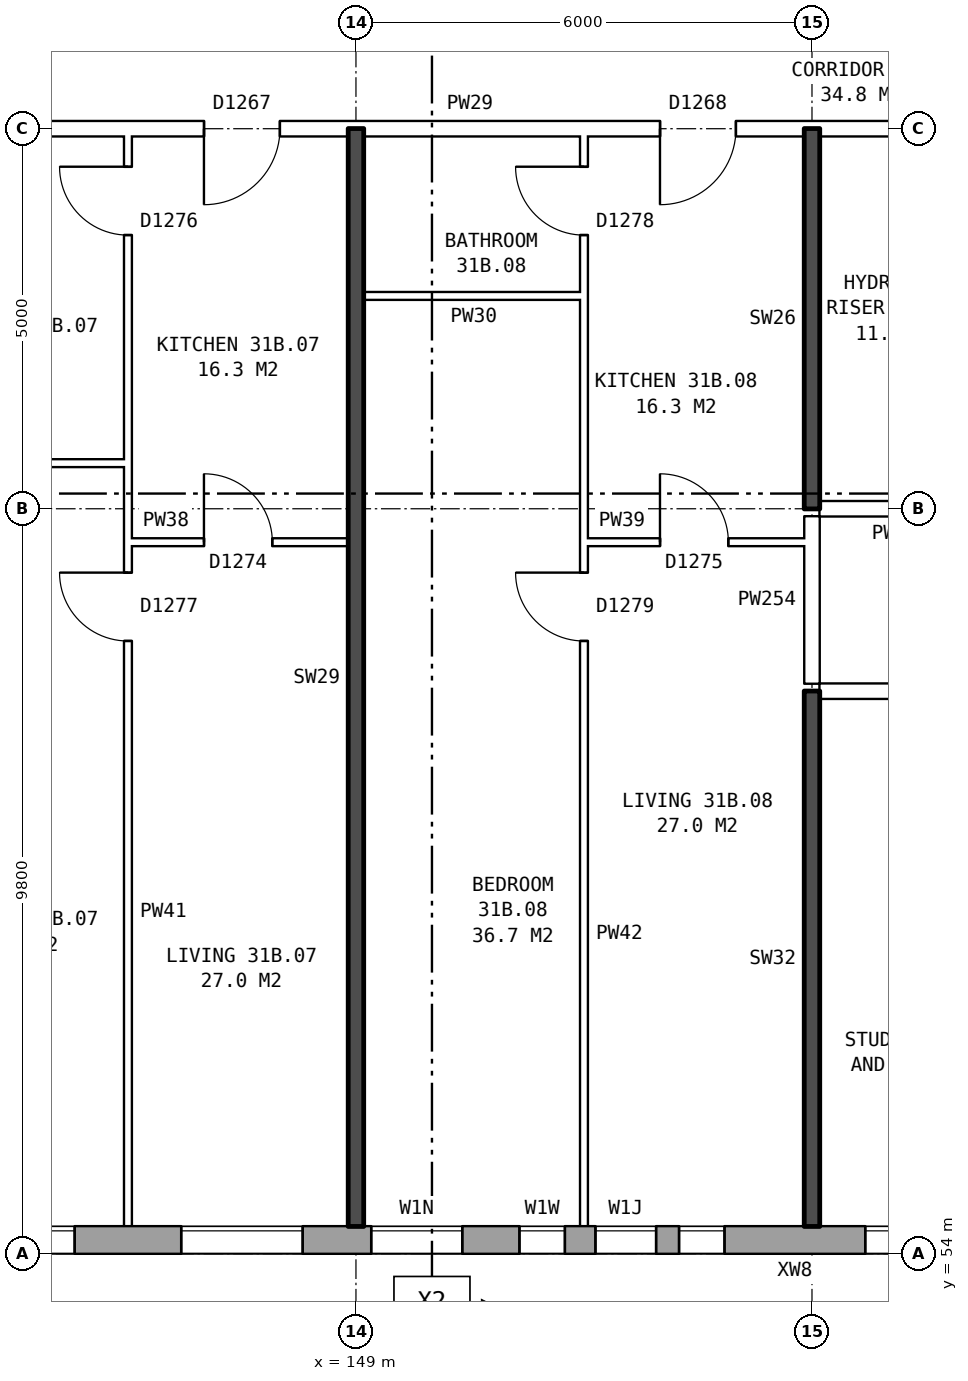
"""IFC4 building model, lengths in metres.
Left out: names, types, materials, properties, quantities, classifications, styles, units other than length and angle.
Written with IfcOpenShell. Run it as: python <this file> out.ifc"""

import sys

from ifc_helpers import new_model, si_unit, direction, frame, frame_2d, origin, place, context, subcontext, project, spatial, rectangle, extrude, element, fill, save


model = new_model("IFC4")
c1 = context("Model", 3, precision=1e-05, world=origin(), true_north=direction((0.0, 1.0)))
c2 = subcontext(c1, "Body", "Model", "MODEL_VIEW")
j1 = project(units=[si_unit("LENGTHUNIT", "METRE"), si_unit("PLANEANGLEUNIT", "RADIAN")], contexts=[c1])
p1 = place(None, origin())
s1 = spatial("IfcSite", under=j1, at=p1, CompositionType="ELEMENT")
p2 = place(p1, origin())
s2 = spatial("IfcBuilding", under=s1, at=p2, CompositionType="ELEMENT")
p3 = place(p2, frame((0.0, 0.0, 111.9)))
s3 = spatial("IfcBuildingStorey", under=s2, at=p3, CompositionType="ELEMENT", Elevation=111.9)
p4 = place(p3, frame((134.075, 54.18, 0.0), z_axis=(0.0, 0.0, 1.0), x_axis=(1.0, 0.0, 0.0)))
e1 = element("IfcWall", 1, at=p4, inside=s3, PredefinedType="STANDARD", context=c2, shape_type="SweptSolid", body=[
    extrude(rectangle(XDim=36.851, YDim=0.36, at=frame_2d((18.425, 0.0))), origin(), (0.0, 0.0, 1.0), 2.85),
])
p5 = place(p4, frame((0.625, 0.0, 0.8)))
e2 = element("IfcOpeningElement", 2, at=p5, cuts=e1, PredefinedType="OPENING", context=c2, shape_type="SweptSolid", body=[
    extrude(rectangle(XDim=1.6, YDim=1.8, at=frame_2d((0.8, 0.9))), frame((0.0, 0.19, 0.0), z_axis=(0.0, -1.0, 0.0), x_axis=(1.0, 0.0, 0.0)), (0.0, 0.0, 1.0), 0.38),
])
p6 = place(p4, frame((3.625, 0.0, 0.8)))
e3 = element("IfcOpeningElement", 3, at=p6, cuts=e1, PredefinedType="OPENING", context=c2, shape_type="SweptSolid", body=[
    extrude(rectangle(XDim=1.6, YDim=1.8, at=frame_2d((0.8, 0.9))), frame((0.0, 0.19, 0.0), z_axis=(0.0, -1.0, 0.0), x_axis=(1.0, 0.0, 0.0)), (0.0, 0.0, 1.0), 0.38),
])
p7 = place(p4, frame((6.625, 0.0, 0.8)))
e4 = element("IfcOpeningElement", 4, at=p7, cuts=e1, PredefinedType="OPENING", context=c2, shape_type="SweptSolid", body=[
    extrude(rectangle(XDim=1.6, YDim=1.8, at=frame_2d((0.8, 0.9))), frame((0.0, 0.19, 0.0), z_axis=(0.0, -1.0, 0.0), x_axis=(1.0, 0.0, 0.0)), (0.0, 0.0, 1.0), 0.38),
])
p8 = place(p4, frame((9.625, 0.0, 0.8)))
e5 = element("IfcOpeningElement", 5, at=p8, cuts=e1, PredefinedType="OPENING", context=c2, shape_type="SweptSolid", body=[
    extrude(rectangle(XDim=1.6, YDim=1.8, at=frame_2d((0.8, 0.9))), frame((0.0, 0.19, 0.0), z_axis=(0.0, -1.0, 0.0), x_axis=(1.0, 0.0, 0.0)), (0.0, 0.0, 1.0), 0.38),
])
p9 = place(p4, frame((12.625, 0.0, 0.8)))
e6 = element("IfcOpeningElement", 6, at=p9, cuts=e1, PredefinedType="OPENING", context=c2, shape_type="SweptSolid", body=[
    extrude(rectangle(XDim=1.6, YDim=1.8, at=frame_2d((0.8, 0.9))), frame((0.0, 0.19, 0.0), z_axis=(0.0, -1.0, 0.0), x_axis=(1.0, 0.0, 0.0)), (0.0, 0.0, 1.0), 0.38),
])
p10 = place(p4, frame((15.125, 0.0, 1.35)))
e7 = element("IfcOpeningElement", 7, at=p10, cuts=e1, PredefinedType="OPENING", context=c2, shape_type="SweptSolid", body=[
    extrude(rectangle(XDim=1.2, YDim=1.2, at=frame_2d((0.6, 0.6))), frame((0.0, 0.19, 0.0), z_axis=(0.0, -1.0, 0.0), x_axis=(1.0, 0.0, 0.0)), (0.0, 0.0, 1.0), 0.38),
])
p11 = place(p4, frame((18.075, 0.0, 0.25)))
e8 = element("IfcOpeningElement", 8, at=p11, cuts=e1, PredefinedType="OPENING", context=c2, shape_type="SweptSolid", body=[
    extrude(rectangle(XDim=0.8, YDim=1.5, at=frame_2d((0.4, 0.75))), frame((0.0, 0.19, 0.0), z_axis=(0.0, -1.0, 0.0), x_axis=(1.0, 0.0, 0.0)), (0.0, 0.0, 1.0), 0.38),
])
p12 = place(p4, frame((21.625, 0.0, 0.8)))
e9 = element("IfcOpeningElement", 9, at=p12, cuts=e1, PredefinedType="OPENING", context=c2, shape_type="SweptSolid", body=[
    extrude(rectangle(XDim=1.6, YDim=1.8, at=frame_2d((0.8, 0.9))), frame((0.0, 0.19, 0.0), z_axis=(0.0, -1.0, 0.0), x_axis=(1.0, 0.0, 0.0)), (0.0, 0.0, 1.0), 0.38),
])
p13 = place(p4, frame((24.625, 0.0, 0.8)))
e10 = element("IfcOpeningElement", 10, at=p13, cuts=e1, PredefinedType="OPENING", context=c2, shape_type="SweptSolid", body=[
    extrude(rectangle(XDim=1.6, YDim=1.8, at=frame_2d((0.8, 0.9))), frame((0.0, 0.19, 0.0), z_axis=(0.0, -1.0, 0.0), x_axis=(1.0, 0.0, 0.0)), (0.0, 0.0, 1.0), 0.38),
])
p14 = place(p4, frame((27.625, 0.0, 0.8)))
e11 = element("IfcOpeningElement", 11, at=p14, cuts=e1, PredefinedType="OPENING", context=c2, shape_type="SweptSolid", body=[
    extrude(rectangle(XDim=1.6, YDim=1.8, at=frame_2d((0.8, 0.9))), frame((0.0, 0.19, 0.0), z_axis=(0.0, -1.0, 0.0), x_axis=(1.0, 0.0, 0.0)), (0.0, 0.0, 1.0), 0.38),
])
p15 = place(p4, frame((30.625, 0.0, 0.8)))
e12 = element("IfcOpeningElement", 12, at=p15, cuts=e1, PredefinedType="OPENING", context=c2, shape_type="SweptSolid", body=[
    extrude(rectangle(XDim=1.6, YDim=1.8, at=frame_2d((0.8, 0.9))), frame((0.0, 0.19, 0.0), z_axis=(0.0, -1.0, 0.0), x_axis=(1.0, 0.0, 0.0)), (0.0, 0.0, 1.0), 0.38),
])
p16 = place(p4, frame((33.625, 0.0, 0.8)))
e13 = element("IfcOpeningElement", 13, at=p16, cuts=e1, PredefinedType="OPENING", context=c2, shape_type="SweptSolid", body=[
    extrude(rectangle(XDim=1.6, YDim=1.8, at=frame_2d((0.8, 0.9))), frame((0.0, 0.19, 0.0), z_axis=(0.0, -1.0, 0.0), x_axis=(1.0, 0.0, 0.0)), (0.0, 0.0, 1.0), 0.38),
])
p17 = place(p4, frame((17.075, 0.0, 0.15)))
e14 = element("IfcOpeningElement", 14, at=p17, cuts=e1, PredefinedType="OPENING", context=c2, shape_type="SweptSolid", body=[
    extrude(rectangle(XDim=0.6, YDim=0.9, at=frame_2d((0.3, 0.45))), frame((0.0, 0.19, 0.0), z_axis=(0.0, -1.0, 0.0), x_axis=(1.0, 0.0, 0.0)), (0.0, 0.0, 1.0), 0.38),
])
p18 = place(p4, frame((19.175, 0.0, 0.15)))
e15 = element("IfcOpeningElement", 15, at=p18, cuts=e1, PredefinedType="OPENING", context=c2, shape_type="SweptSolid", body=[
    extrude(rectangle(XDim=0.6, YDim=0.9, at=frame_2d((0.3, 0.45))), frame((0.0, 0.19, 0.0), z_axis=(0.0, -1.0, 0.0), x_axis=(1.0, 0.0, 0.0)), (0.0, 0.0, 1.0), 0.38),
])
p19 = place(p3, frame((155.1, 61.4, 0.0), z_axis=(0.0, 0.0, 1.0), x_axis=(1.0, 0.0, 0.0)))
e16 = element("IfcWall", 16, at=p19, inside=s3, PredefinedType="PARTITIONING", context=c2, shape_type="SweptSolid", body=[
    extrude(rectangle(XDim=18.54, YDim=0.2, at=frame_2d((9.27, 0.0))), origin(), (0.0, 0.0, 1.0), 2.85),
])
p20 = place(p19, frame((1.45, 0.0, 0.0)))
e17 = element("IfcOpeningElement", 17, at=p20, cuts=e16, PredefinedType="OPENING", context=c2, shape_type="SweptSolid", body=[
    extrude(rectangle(XDim=1.0, YDim=2.1, at=frame_2d((0.5, 1.05))), frame((0.0, 0.11, 0.0), z_axis=(0.0, -1.0, 0.0), x_axis=(1.0, 0.0, 0.0)), (0.0, 0.0, 1.0), 0.22),
])
p21 = place(p19, frame((9.6, 0.0, 0.0)))
e18 = element("IfcOpeningElement", 18, at=p21, cuts=e16, PredefinedType="OPENING", context=c2, shape_type="SweptSolid", body=[
    extrude(rectangle(XDim=1.0, YDim=2.1, at=frame_2d((0.5, 1.05))), frame((0.0, 0.11, 0.0), z_axis=(0.0, -1.0, 0.0), x_axis=(1.0, 0.0, 0.0)), (0.0, 0.0, 1.0), 0.22),
])
p22 = place(p19, frame((13.4, 0.0, 0.0)))
e19 = element("IfcOpeningElement", 19, at=p22, cuts=e16, PredefinedType="OPENING", context=c2, shape_type="SweptSolid", body=[
    extrude(rectangle(XDim=1.0, YDim=2.1, at=frame_2d((0.5, 1.05))), frame((0.0, 0.11, 0.0), z_axis=(0.0, -1.0, 0.0), x_axis=(1.0, 0.0, 0.0)), (0.0, 0.0, 1.0), 0.22),
])
p23 = place(p3, frame((146.0, 63.36, 0.0), z_axis=(0.0, 0.0, 1.0), x_axis=(1.0, 0.0, 0.0)))
e20 = element("IfcWall", 20, at=p23, inside=s3, PredefinedType="PARTITIONING", context=c2, shape_type="SweptSolid", body=[
    extrude(rectangle(XDim=2.9, YDim=0.1, at=frame_2d((1.45, 0.0))), origin(), (0.0, 0.0, 1.0), 2.85),
])
p24 = place(p23, frame((1.0, 0.0, 0.0)))
e21 = element("IfcOpeningElement", 21, at=p24, cuts=e20, PredefinedType="OPENING", context=c2, shape_type="SweptSolid", body=[
    extrude(rectangle(XDim=0.9, YDim=2.1, at=frame_2d((0.45, 1.05))), frame((0.0, 0.06, 0.0), z_axis=(0.0, -1.0, 0.0), x_axis=(1.0, 0.0, 0.0)), (0.0, 0.0, 1.0), 0.12),
])
p25 = place(p3, frame((152.0, 63.36, 0.0), z_axis=(0.0, 0.0, 1.0), x_axis=(1.0, 0.0, 0.0)))
e22 = element("IfcWall", 22, at=p25, inside=s3, PredefinedType="PARTITIONING", context=c2, shape_type="SweptSolid", body=[
    extrude(rectangle(XDim=2.9, YDim=0.1, at=frame_2d((1.45, 0.0))), origin(), (0.0, 0.0, 1.0), 2.85),
])
p26 = place(p25, frame((1.0, 0.0, 0.0)))
e23 = element("IfcOpeningElement", 23, at=p26, cuts=e22, PredefinedType="OPENING", context=c2, shape_type="SweptSolid", body=[
    extrude(rectangle(XDim=0.9, YDim=2.1, at=frame_2d((0.45, 1.05))), frame((0.0, 0.06, 0.0), z_axis=(0.0, -1.0, 0.0), x_axis=(1.0, 0.0, 0.0)), (0.0, 0.0, 1.0), 0.12),
])
p27 = place(p3, frame((155.1, 63.8, 0.0), z_axis=(0.0, 0.0, 1.0), x_axis=(1.0, 0.0, 0.0)))
e24 = element("IfcWall", 24, at=p27, inside=s3, PredefinedType="PARTITIONING", context=c2, shape_type="SweptSolid", body=[
    extrude(rectangle(XDim=2.14, YDim=0.2, at=frame_2d((1.07, 0.0))), origin(), (0.0, 0.0, 1.0), 2.85),
])
p28 = place(p3, frame((142.76, 64.4, 0.0), z_axis=(0.0, 0.0, 1.0), x_axis=(1.0, 0.0, 0.0)))
e25 = element("IfcWall", 25, at=p28, inside=s3, PredefinedType="PARTITIONING", context=c2, shape_type="SweptSolid", body=[
    extrude(rectangle(XDim=3.24, YDim=0.1, at=frame_2d((1.62, 0.0))), origin(), (0.0, 0.0, 1.0), 2.85),
])
p29 = place(p3, frame((149.1, 66.6, 0.0), z_axis=(0.0, 0.0, 1.0), x_axis=(1.0, 0.0, 0.0)))
e26 = element("IfcWall", 26, at=p29, inside=s3, PredefinedType="PARTITIONING", context=c2, shape_type="SweptSolid", body=[
    extrude(rectangle(XDim=2.9, YDim=0.1, at=frame_2d((1.45, 0.0))), origin(), (0.0, 0.0, 1.0), 2.85),
])
p30 = place(p3, frame((142.76, 68.8, 0.0), z_axis=(0.0, 0.0, 1.0), x_axis=(1.0, 0.0, 0.0)))
e27 = element("IfcWall", 27, at=p30, inside=s3, PredefinedType="PARTITIONING", context=c2, shape_type="SweptSolid", body=[
    extrude(rectangle(XDim=14.48, YDim=0.2, at=frame_2d((7.24, 0.0))), origin(), (0.0, 0.0, 1.0), 2.85),
])
p31 = place(p30, frame((4.24, 0.0, 0.0)))
e28 = element("IfcOpeningElement", 28, at=p31, cuts=e27, PredefinedType="OPENING", context=c2, shape_type="SweptSolid", body=[
    extrude(rectangle(XDim=1.0, YDim=2.1, at=frame_2d((0.5, 1.05))), frame((0.0, 0.11, 0.0), z_axis=(0.0, -1.0, 0.0), x_axis=(1.0, 0.0, 0.0)), (0.0, 0.0, 1.0), 0.22),
])
p32 = place(p30, frame((10.24, 0.0, 0.0)))
e29 = element("IfcOpeningElement", 29, at=p32, cuts=e27, PredefinedType="OPENING", context=c2, shape_type="SweptSolid", body=[
    extrude(rectangle(XDim=1.0, YDim=2.1, at=frame_2d((0.5, 1.05))), frame((0.0, 0.11, 0.0), z_axis=(0.0, -1.0, 0.0), x_axis=(1.0, 0.0, 0.0)), (0.0, 0.0, 1.0), 0.22),
])
p33 = place(p3, frame((146.0, 54.36, 0.0), z_axis=(0.0, 0.0, 1.0), x_axis=(0.0, 1.0, 0.0)))
e30 = element("IfcWall", 30, at=p33, inside=s3, PredefinedType="PARTITIONING", context=c2, shape_type="SweptSolid", body=[
    extrude(rectangle(XDim=14.34, YDim=0.1, at=frame_2d((7.17, 0.0))), origin(), (0.0, 0.0, 1.0), 2.85),
])
p34 = place(p33, frame((7.7, 0.0, 0.0)))
e31 = element("IfcOpeningElement", 31, at=p34, cuts=e30, PredefinedType="OPENING", context=c2, shape_type="SweptSolid", body=[
    extrude(rectangle(XDim=0.9, YDim=2.1, at=frame_2d((0.45, 1.05))), frame((0.0, 0.06, 0.0), z_axis=(0.0, -1.0, 0.0), x_axis=(1.0, 0.0, 0.0)), (0.0, 0.0, 1.0), 0.12),
])
p35 = place(p33, frame((13.04, 0.0, 0.0)))
e32 = element("IfcOpeningElement", 32, at=p35, cuts=e30, PredefinedType="OPENING", context=c2, shape_type="SweptSolid", body=[
    extrude(rectangle(XDim=0.9, YDim=2.1, at=frame_2d((0.45, 1.05))), frame((0.0, 0.06, 0.0), z_axis=(0.0, -1.0, 0.0), x_axis=(1.0, 0.0, 0.0)), (0.0, 0.0, 1.0), 0.12),
])
p36 = place(p3, frame((149.0, 54.36, 0.0), z_axis=(0.0, 0.0, 1.0), x_axis=(0.0, 1.0, 0.0)))
e33 = element("IfcWall", 33, at=p36, inside=s3, PredefinedType="SOLIDWALL", context=c2, shape_type="SweptSolid", body=[
    extrude(rectangle(XDim=14.44, YDim=0.2, at=frame_2d((7.22, 0.0))), origin(), (0.0, 0.0, 1.0), 2.85),
])
p37 = place(p3, frame((152.0, 54.36, 0.0), z_axis=(0.0, 0.0, 1.0), x_axis=(0.0, 1.0, 0.0)))
e34 = element("IfcWall", 34, at=p37, inside=s3, PredefinedType="PARTITIONING", context=c2, shape_type="SweptSolid", body=[
    extrude(rectangle(XDim=14.34, YDim=0.1, at=frame_2d((7.17, 0.0))), origin(), (0.0, 0.0, 1.0), 2.85),
])
p38 = place(p37, frame((7.7, 0.0, 0.0)))
e35 = element("IfcOpeningElement", 35, at=p38, cuts=e34, PredefinedType="OPENING", context=c2, shape_type="SweptSolid", body=[
    extrude(rectangle(XDim=0.9, YDim=2.1, at=frame_2d((0.45, 1.05))), frame((0.0, 0.06, 0.0), z_axis=(0.0, -1.0, 0.0), x_axis=(1.0, 0.0, 0.0)), (0.0, 0.0, 1.0), 0.12),
])
p39 = place(p37, frame((13.04, 0.0, 0.0)))
e36 = element("IfcOpeningElement", 36, at=p39, cuts=e34, PredefinedType="OPENING", context=c2, shape_type="SweptSolid", body=[
    extrude(rectangle(XDim=0.9, YDim=2.1, at=frame_2d((0.45, 1.05))), frame((0.0, 0.06, 0.0), z_axis=(0.0, -1.0, 0.0), x_axis=(1.0, 0.0, 0.0)), (0.0, 0.0, 1.0), 0.12),
])
p40 = place(p3, frame((155.0, 54.36, 0.0), z_axis=(0.0, 0.0, 1.0), x_axis=(0.0, 1.0, 0.0)))
e37 = element("IfcWall", 37, at=p40, inside=s3, PredefinedType="SOLIDWALL", context=c2, shape_type="SweptSolid", body=[
    extrude(rectangle(XDim=7.04, YDim=0.2, at=frame_2d((3.52, 0.0))), origin(), (0.0, 0.0, 1.0), 2.85),
])
p41 = place(p3, frame((155.0, 61.5, 0.0), z_axis=(0.0, 0.0, 1.0), x_axis=(0.0, 1.0, 0.0)))
e38 = element("IfcWall", 38, at=p41, inside=s3, PredefinedType="PARTITIONING", context=c2, shape_type="SweptSolid", body=[
    extrude(rectangle(XDim=2.2, YDim=0.2, at=frame_2d((1.1, 0.0))), origin(), (0.0, 0.0, 1.0), 2.85),
])
p42 = place(p3, frame((155.0, 63.8, 0.0), z_axis=(0.0, 0.0, 1.0), x_axis=(0.0, 1.0, 0.0)))
e39 = element("IfcWall", 39, at=p42, inside=s3, PredefinedType="SOLIDWALL", context=c2, shape_type="SweptSolid", body=[
    extrude(rectangle(XDim=5.0, YDim=0.2, at=frame_2d((2.5, 0.0))), origin(), (0.0, 0.0, 1.0), 2.85),
])
p43 = place(p8, origin())
e40 = element("IfcWindow", 40, at=p43, inside=s3, PartitioningType="SINGLE_PANEL", PredefinedType="WINDOW", context=c2, shape_type="SweptSolid", body=[
    extrude(rectangle(XDim=1.6, YDim=1.8, at=frame_2d((0.8, 0.9))), frame((0.0, 0.15, 0.0), z_axis=(0.0, -1.0, 0.0), x_axis=(1.0, 0.0, 0.0)), (0.0, 0.0, 1.0), 0.06),
])
fill(e5, e40)
p44 = place(p9, origin())
e41 = element("IfcWindow", 41, at=p44, inside=s3, PartitioningType="SINGLE_PANEL", PredefinedType="WINDOW", context=c2, shape_type="SweptSolid", body=[
    extrude(rectangle(XDim=1.6, YDim=1.8, at=frame_2d((0.8, 0.9))), frame((0.0, 0.15, 0.0), z_axis=(0.0, -1.0, 0.0), x_axis=(1.0, 0.0, 0.0)), (0.0, 0.0, 1.0), 0.06),
])
fill(e6, e41)
p45 = place(p10, origin())
e42 = element("IfcWindow", 42, at=p45, inside=s3, PartitioningType="SINGLE_PANEL", PredefinedType="WINDOW", context=c2, shape_type="SweptSolid", body=[
    extrude(rectangle(XDim=1.2, YDim=1.2, at=frame_2d((0.6, 0.6))), frame((0.0, 0.15, 0.0), z_axis=(0.0, -1.0, 0.0), x_axis=(1.0, 0.0, 0.0)), (0.0, 0.0, 1.0), 0.06),
])
fill(e7, e42)
p46 = place(p11, origin())
e43 = element("IfcWindow", 43, at=p46, inside=s3, PartitioningType="SINGLE_PANEL", PredefinedType="WINDOW", context=c2, shape_type="SweptSolid", body=[
    extrude(rectangle(XDim=0.8, YDim=1.5, at=frame_2d((0.4, 0.75))), frame((0.0, 0.15, 0.0), z_axis=(0.0, -1.0, 0.0), x_axis=(1.0, 0.0, 0.0)), (0.0, 0.0, 1.0), 0.06),
])
fill(e8, e43)
p47 = place(p12, origin())
e44 = element("IfcWindow", 44, at=p47, inside=s3, PartitioningType="SINGLE_PANEL", PredefinedType="WINDOW", context=c2, shape_type="SweptSolid", body=[
    extrude(rectangle(XDim=1.6, YDim=1.8, at=frame_2d((0.8, 0.9))), frame((0.0, 0.15, 0.0), z_axis=(0.0, -1.0, 0.0), x_axis=(1.0, 0.0, 0.0)), (0.0, 0.0, 1.0), 0.06),
])
fill(e9, e44)
p48 = place(p34, origin())
e45 = element("IfcDoor", 45, at=p48, inside=s3, OperationType="SINGLE_SWING_RIGHT", PredefinedType="DOOR", context=c2, shape_type="SweptSolid", body=[
    extrude(rectangle(XDim=0.9, YDim=2.1, at=frame_2d((0.45, 1.05))), frame((0.0, 0.025, 0.0), z_axis=(0.0, -1.0, 0.0), x_axis=(1.0, 0.0, 0.0)), (0.0, 0.0, 1.0), 0.05),
])
fill(e31, e45)
p49 = place(p31, frame((1.0, 0.0, 0.0), z_axis=(0.0, 0.0, 1.0), x_axis=(-1.0, 0.0, 0.0)))
e46 = element("IfcDoor", 46, at=p49, inside=s3, OperationType="SINGLE_SWING_RIGHT", PredefinedType="DOOR", context=c2, shape_type="SweptSolid", body=[
    extrude(rectangle(XDim=1.0, YDim=2.1, at=frame_2d((0.5, 1.05))), frame((0.0, 0.025, 0.0), z_axis=(0.0, -1.0, 0.0), x_axis=(1.0, 0.0, 0.0)), (0.0, 0.0, 1.0), 0.05),
])
fill(e28, e46)
p50 = place(p24, origin())
e47 = element("IfcDoor", 47, at=p50, inside=s3, OperationType="SINGLE_SWING_LEFT", PredefinedType="DOOR", context=c2, shape_type="SweptSolid", body=[
    extrude(rectangle(XDim=0.9, YDim=2.1, at=frame_2d((0.45, 1.05))), frame((0.0, 0.025, 0.0), z_axis=(0.0, -1.0, 0.0), x_axis=(1.0, 0.0, 0.0)), (0.0, 0.0, 1.0), 0.05),
])
fill(e21, e47)
p51 = place(p35, origin())
e48 = element("IfcDoor", 48, at=p51, inside=s3, OperationType="SINGLE_SWING_RIGHT", PredefinedType="DOOR", context=c2, shape_type="SweptSolid", body=[
    extrude(rectangle(XDim=0.9, YDim=2.1, at=frame_2d((0.45, 1.05))), frame((0.0, 0.025, 0.0), z_axis=(0.0, -1.0, 0.0), x_axis=(1.0, 0.0, 0.0)), (0.0, 0.0, 1.0), 0.05),
])
fill(e32, e48)
p52 = place(p38, origin())
e49 = element("IfcDoor", 49, at=p52, inside=s3, OperationType="SINGLE_SWING_RIGHT", PredefinedType="DOOR", context=c2, shape_type="SweptSolid", body=[
    extrude(rectangle(XDim=0.9, YDim=2.1, at=frame_2d((0.45, 1.05))), frame((0.0, 0.025, 0.0), z_axis=(0.0, -1.0, 0.0), x_axis=(1.0, 0.0, 0.0)), (0.0, 0.0, 1.0), 0.05),
])
fill(e35, e49)
p53 = place(p32, frame((1.0, 0.0, 0.0), z_axis=(0.0, 0.0, 1.0), x_axis=(-1.0, 0.0, 0.0)))
e50 = element("IfcDoor", 50, at=p53, inside=s3, OperationType="SINGLE_SWING_RIGHT", PredefinedType="DOOR", context=c2, shape_type="SweptSolid", body=[
    extrude(rectangle(XDim=1.0, YDim=2.1, at=frame_2d((0.5, 1.05))), frame((0.0, 0.025, 0.0), z_axis=(0.0, -1.0, 0.0), x_axis=(1.0, 0.0, 0.0)), (0.0, 0.0, 1.0), 0.05),
])
fill(e29, e50)
p54 = place(p26, origin())
e51 = element("IfcDoor", 51, at=p54, inside=s3, OperationType="SINGLE_SWING_LEFT", PredefinedType="DOOR", context=c2, shape_type="SweptSolid", body=[
    extrude(rectangle(XDim=0.9, YDim=2.1, at=frame_2d((0.45, 1.05))), frame((0.0, 0.025, 0.0), z_axis=(0.0, -1.0, 0.0), x_axis=(1.0, 0.0, 0.0)), (0.0, 0.0, 1.0), 0.05),
])
fill(e23, e51)
p55 = place(p39, origin())
e52 = element("IfcDoor", 52, at=p55, inside=s3, OperationType="SINGLE_SWING_RIGHT", PredefinedType="DOOR", context=c2, shape_type="SweptSolid", body=[
    extrude(rectangle(XDim=0.9, YDim=2.1, at=frame_2d((0.45, 1.05))), frame((0.0, 0.025, 0.0), z_axis=(0.0, -1.0, 0.0), x_axis=(1.0, 0.0, 0.0)), (0.0, 0.0, 1.0), 0.05),
])
fill(e36, e52)
p56 = place(p17, origin())
e53 = element("IfcWindow", 53, at=p56, inside=s3, PartitioningType="SINGLE_PANEL", PredefinedType="WINDOW", context=c2, shape_type="SweptSolid", body=[
    extrude(rectangle(XDim=0.6, YDim=0.9, at=frame_2d((0.3, 0.45))), frame((0.0, 0.15, 0.0), z_axis=(0.0, -1.0, 0.0), x_axis=(1.0, 0.0, 0.0)), (0.0, 0.0, 1.0), 0.06),
])
fill(e14, e53)
p57 = place(p18, origin())
e54 = element("IfcWindow", 54, at=p57, inside=s3, PartitioningType="SINGLE_PANEL", PredefinedType="WINDOW", context=c2, shape_type="SweptSolid", body=[
    extrude(rectangle(XDim=0.6, YDim=0.9, at=frame_2d((0.3, 0.45))), frame((0.0, 0.15, 0.0), z_axis=(0.0, -1.0, 0.0), x_axis=(1.0, 0.0, 0.0)), (0.0, 0.0, 1.0), 0.06),
])
fill(e15, e54)
save(model, sys.argv[1])
